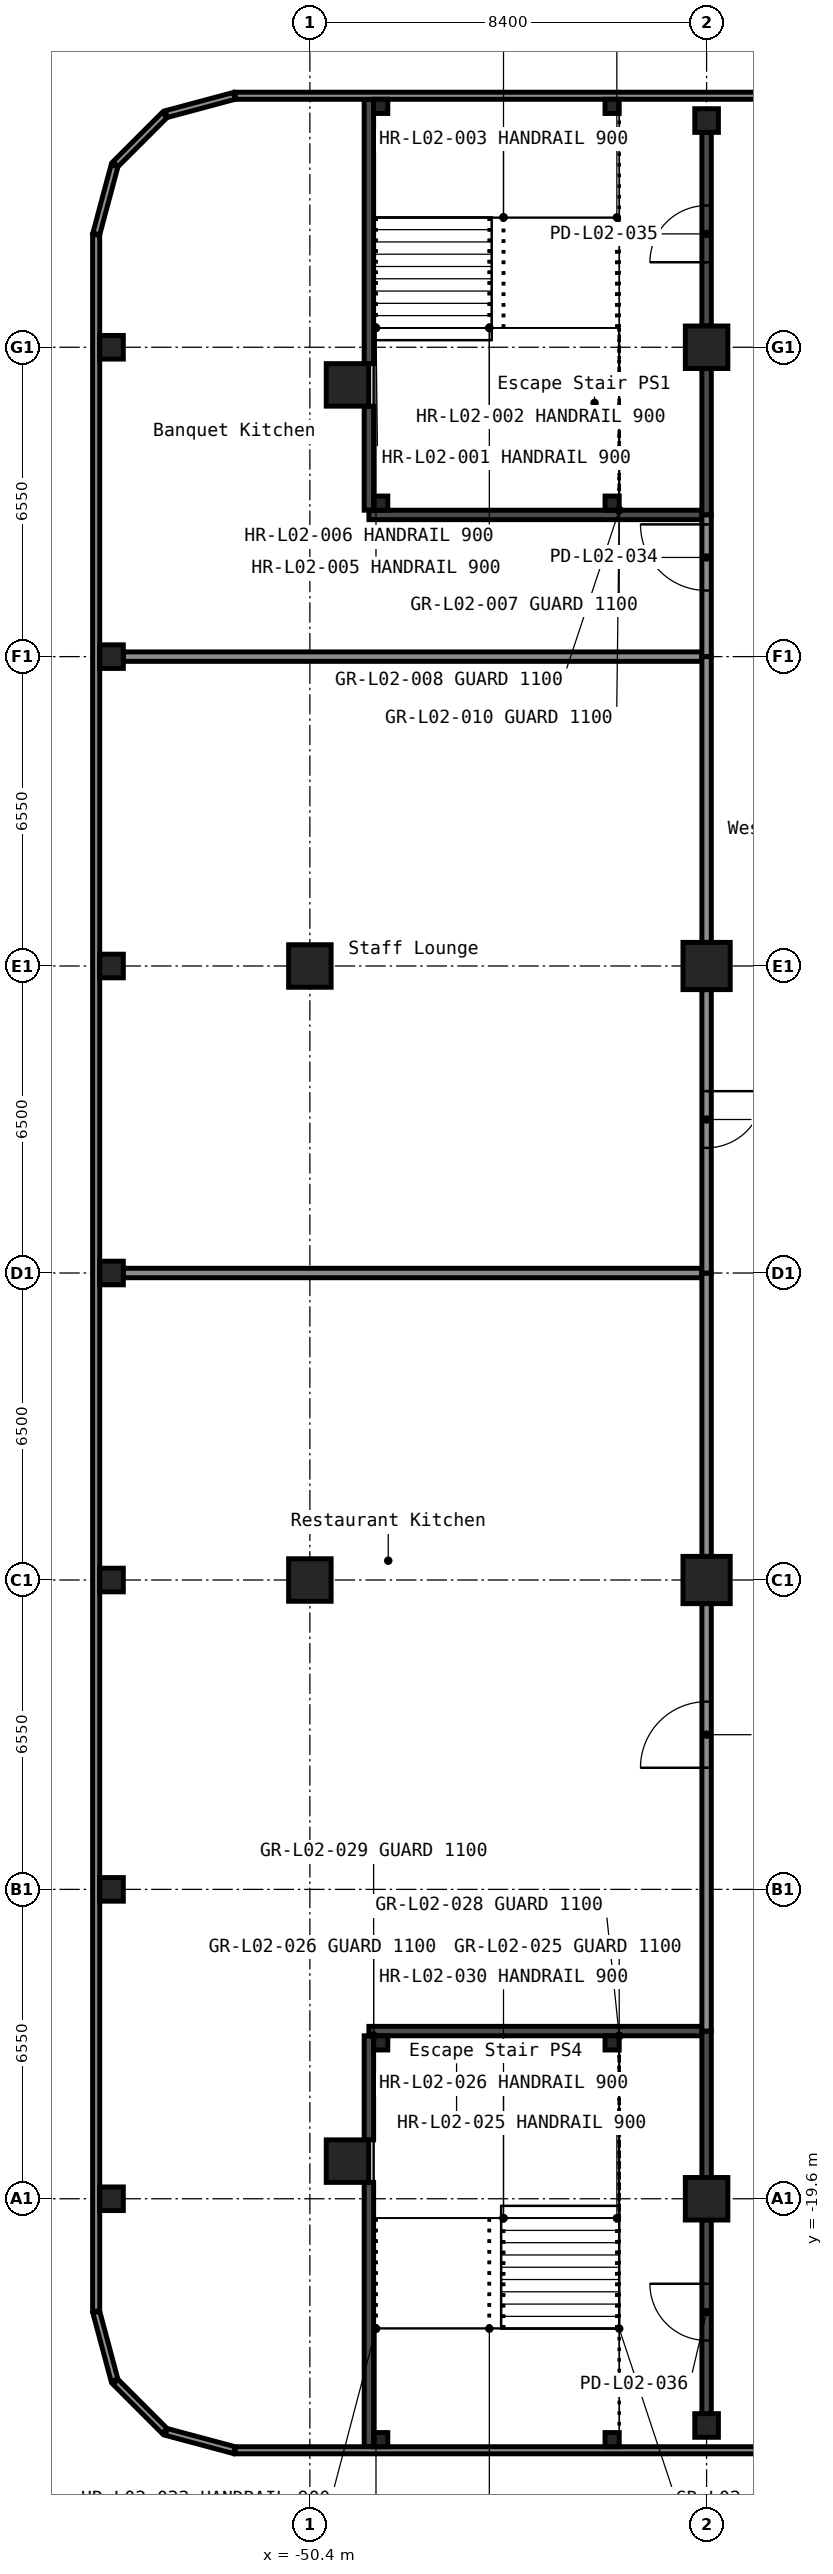
"""IFC4 building model, lengths in metres.
Left out: names, types, materials, properties, quantities, classifications, styles, units other than length and angle.
Written with IfcOpenShell. Run it as: python <this file> out.ifc"""

import sys

from ifc_helpers import new_model, si_unit, direction, frame, frame_2d, origin, origin_2d, place, context, subcontext, project, spatial, rectangle, hollow_rectangle, extrude, element, fill, save


model = new_model("IFC4")
c1 = context("Model", 3, precision=1e-05, world=origin(), true_north=direction((0.0, 1.0)))
c2 = subcontext(c1, "Body", "Model", "MODEL_VIEW")
j1 = project(units=[si_unit("LENGTHUNIT", "METRE"), si_unit("PLANEANGLEUNIT", "RADIAN")], contexts=[c1])
p1 = place(None, origin())
s1 = spatial("IfcSite", under=j1, at=p1, CompositionType="ELEMENT")
p2 = place(p1, origin())
s2 = spatial("IfcBuilding", under=s1, at=p2, CompositionType="ELEMENT")
p3 = place(p2, frame((0.0, 0.0, 9.0)))
s3 = spatial("IfcBuildingStorey", under=s2, at=p3, CompositionType="ELEMENT", Elevation=9.0)
for number, where, z_axis, x_axis in (
    (1, (-49.603, -18.803, 0.0), (0.0, 0.0, 1.0), (1.0, 0.0, 0.0)),
    (2, (-50.4, -6.5, 0.0), (0.0, 0.0, 1.0), (1.0, 0.0, 0.0)),
    (3, (-50.4, 6.5, 0.0), (0.0, 0.0, 1.0), (1.0, 0.0, 0.0)),
    (4, (-49.603, 18.803, 0.0), (0.0, 0.0, 1.0), (1.0, 0.0, 0.0)),
    (5, (-42.0, -19.6, 0.0), (0.0, 0.0, 1.0), (1.0, 0.0, 0.0)),
):
    element("IfcColumn", number, at=place(p3, frame(where, z_axis=z_axis, x_axis=x_axis)), inside=s3, PredefinedType="COLUMN", context=c2, shape_type="SweptSolid", body=[
        extrude(hollow_rectangle(XDim=0.9, YDim=0.9, WallThickness=0.036, at=origin_2d()), origin(), (0.0, 0.0, 1.0), 5.6),
    ])
for number, where, z_axis, x_axis in (
    (6, (-42.0, -6.5, 0.0), (0.0, 0.0, 1.0), (1.0, 0.0, 0.0)),
    (7, (-42.0, 6.5, 0.0), (0.0, 0.0, 1.0), (1.0, 0.0, 0.0)),
):
    element("IfcColumn", number, at=place(p3, frame(where, z_axis=z_axis, x_axis=x_axis)), inside=s3, PredefinedType="COLUMN", context=c2, shape_type="SweptSolid", body=[
        extrude(hollow_rectangle(XDim=1.0, YDim=1.0, WallThickness=0.04, at=origin_2d()), origin(), (0.0, 0.0, 1.0), 5.6),
    ])
p4 = place(p3, frame((-42.0, 19.6, 0.0), z_axis=(0.0, 0.0, 1.0), x_axis=(1.0, 0.0, 0.0)))
e8 = element("IfcColumn", 8, at=p4, inside=s3, PredefinedType="COLUMN", context=c2, shape_type="SweptSolid", body=[
    extrude(hollow_rectangle(XDim=0.9, YDim=0.9, WallThickness=0.036, at=origin_2d()), origin(), (0.0, 0.0, 1.0), 5.6),
])
for number, where, z_axis, x_axis in (
    (9, (-42.0, -24.4, 0.0), (0.0, 0.0, 1.0), (1.0, 0.0, 0.0)),
    (10, (-42.0, 24.4, 0.0), (0.0, 0.0, 1.0), (1.0, 0.0, 0.0)),
    (11, (-54.6, -19.6, 0.0), (0.0, 0.0, 1.0), (1.0, 0.0, 0.0)),
    (12, (-54.6, -13.05, 0.0), (0.0, 0.0, 1.0), (1.0, 0.0, 0.0)),
    (13, (-54.6, -6.5, 0.0), (0.0, 0.0, 1.0), (1.0, 0.0, 0.0)),
    (14, (-54.6, 0.0, 0.0), (0.0, 0.0, 1.0), (1.0, 0.0, 0.0)),
    (15, (-54.6, 6.5, 0.0), (0.0, 0.0, 1.0), (1.0, 0.0, 0.0)),
    (16, (-54.6, 13.05, 0.0), (0.0, 0.0, 1.0), (1.0, 0.0, 0.0)),
    (17, (-54.6, 19.6, 0.0), (0.0, 0.0, 1.0), (1.0, 0.0, 0.0)),
):
    element("IfcColumn", number, at=place(p3, frame(where, z_axis=z_axis, x_axis=x_axis)), inside=s3, PredefinedType="COLUMN", context=c2, shape_type="SweptSolid", body=[
        extrude(hollow_rectangle(XDim=0.5, YDim=0.5, WallThickness=0.019, InnerFilletRadius=0.029, OuterFilletRadius=0.048, at=origin_2d()), origin(), (0.0, 0.0, 1.0), 5.6),
    ])
for number, where, z_axis, x_axis in (
    (18, (-48.9, 16.3, -0.3), (0.0, 0.0, 1.0), (1.0, 0.0, 0.0)),
    (19, (-44.0, 16.3, -0.3), (0.0, 0.0, 1.0), (1.0, 0.0, 0.0)),
    (20, (-44.0, -16.3, -0.3), (0.0, 0.0, 1.0), (1.0, 0.0, 0.0)),
    (21, (-48.9, -16.3, -0.3), (0.0, 0.0, 1.0), (1.0, 0.0, 0.0)),
):
    element("IfcColumn", number, at=place(p3, frame(where, z_axis=z_axis, x_axis=x_axis)), inside=s3, PredefinedType="COLUMN", context=c2, shape_type="SweptSolid", body=[
        extrude(rectangle(XDim=0.3, YDim=0.3, at=origin_2d()), origin(), (0.0, 0.0, 1.0), 1.55),
    ])
p5 = place(p3, frame((-54.35, 0.0, 0.0), z_axis=(0.0, 0.0, 1.0), x_axis=(1.0, 0.0, 0.0)))
e22 = element("IfcWall", 22, at=p5, inside=s3, PredefinedType="PARTITIONING", context=c2, shape_type="SweptSolid", body=[
    extrude(rectangle(XDim=12.25, YDim=0.2, at=frame_2d((6.125, 0.0))), origin(), (0.0, 0.0, 1.0), 5.6),
])
p6 = place(p3, frame((-49.15, 16.15, 0.0), z_axis=(0.0, 0.0, 1.0), x_axis=(0.0, 1.0, 0.0)))
e23 = element("IfcWall", 23, at=p6, inside=s3, PredefinedType="SHEAR", context=c2, shape_type="SweptSolid", body=[
    extrude(rectangle(XDim=2.203, YDim=0.2, at=frame_2d((1.102, 0.0))), origin(), (0.0, 0.0, 1.0), 5.6),
])
p7 = place(p3, frame((-49.15, 19.253, 0.0), z_axis=(0.0, 0.0, 1.0), x_axis=(0.0, 1.0, 0.0)))
e24 = element("IfcWall", 24, at=p7, inside=s3, PredefinedType="SHEAR", context=c2, shape_type="SweptSolid", body=[
    extrude(rectangle(XDim=5.597, YDim=0.2, at=frame_2d((2.798, 0.0))), origin(), (0.0, 0.0, 1.0), 5.6),
])
p8 = place(p3, frame((-42.1, 16.05, 0.0), z_axis=(0.0, 0.0, 1.0), x_axis=(-1.0, 0.0, 0.0)))
e25 = element("IfcWall", 25, at=p8, inside=s3, PredefinedType="SHEAR", context=c2, shape_type="SweptSolid", body=[
    extrude(rectangle(XDim=7.05, YDim=0.2, at=frame_2d((3.525, 0.0))), origin(), (0.0, 0.0, 1.0), 5.6),
])
p9 = place(p3, frame((-42.0, 24.15, 0.0), z_axis=(0.0, 0.0, 1.0), x_axis=(0.0, -1.0, 0.0)))
e26 = element("IfcWall", 26, at=p9, inside=s3, PredefinedType="SHEAR", context=c2, shape_type="SweptSolid", body=[
    extrude(rectangle(XDim=4.1, YDim=0.2, at=frame_2d((2.05, 0.0))), origin(), (0.0, 0.0, 1.0), 5.6),
])
p10 = place(p9, frame((1.55, 0.0, 0.0)))
e27 = element("IfcOpeningElement", 27, at=p10, cuts=e26, PredefinedType="OPENING", context=c2, shape_type="SweptSolid", body=[
    extrude(rectangle(XDim=1.2, YDim=2.1, at=frame_2d((0.6, 1.05))), frame((0.0, 0.11, 0.0), z_axis=(0.0, -1.0, 0.0), x_axis=(1.0, 0.0, 0.0)), (0.0, 0.0, 1.0), 0.22),
])
p11 = place(p3, frame((-42.0, 19.15, 0.0), z_axis=(0.0, 0.0, 1.0), x_axis=(0.0, -1.0, 0.0)))
e28 = element("IfcWall", 28, at=p11, inside=s3, PredefinedType="SHEAR", context=c2, shape_type="SweptSolid", body=[
    extrude(rectangle(XDim=3.1, YDim=0.2, at=frame_2d((1.55, 0.0))), origin(), (0.0, 0.0, 1.0), 5.6),
])
p12 = place(p3, frame((-49.15, -24.85, 0.0), z_axis=(0.0, 0.0, 1.0), x_axis=(0.0, 1.0, 0.0)))
e29 = element("IfcWall", 29, at=p12, inside=s3, PredefinedType="SHEAR", context=c2, shape_type="SweptSolid", body=[
    extrude(rectangle(XDim=5.597, YDim=0.2, at=frame_2d((2.798, 0.0))), origin(), (0.0, 0.0, 1.0), 5.6),
])
p13 = place(p3, frame((-49.15, -18.353, 0.0), z_axis=(0.0, 0.0, 1.0), x_axis=(0.0, 1.0, 0.0)))
e30 = element("IfcWall", 30, at=p13, inside=s3, PredefinedType="SHEAR", context=c2, shape_type="SweptSolid", body=[
    extrude(rectangle(XDim=2.203, YDim=0.2, at=frame_2d((1.102, 0.0))), origin(), (0.0, 0.0, 1.0), 5.6),
])
p14 = place(p3, frame((-49.15, -16.05, 0.0), z_axis=(0.0, 0.0, 1.0), x_axis=(1.0, 0.0, 0.0)))
e31 = element("IfcWall", 31, at=p14, inside=s3, PredefinedType="SHEAR", context=c2, shape_type="SweptSolid", body=[
    extrude(rectangle(XDim=7.05, YDim=0.2, at=frame_2d((3.525, 0.0))), origin(), (0.0, 0.0, 1.0), 5.6),
])
p15 = place(p3, frame((-42.0, -16.05, 0.0), z_axis=(0.0, 0.0, 1.0), x_axis=(0.0, -1.0, 0.0)))
e32 = element("IfcWall", 32, at=p15, inside=s3, PredefinedType="SHEAR", context=c2, shape_type="SweptSolid", body=[
    extrude(rectangle(XDim=3.1, YDim=0.2, at=frame_2d((1.55, 0.0))), origin(), (0.0, 0.0, 1.0), 5.6),
])
p16 = place(p3, frame((-42.0, -20.05, 0.0), z_axis=(0.0, 0.0, 1.0), x_axis=(0.0, -1.0, 0.0)))
e33 = element("IfcWall", 33, at=p16, inside=s3, PredefinedType="SHEAR", context=c2, shape_type="SweptSolid", body=[
    extrude(rectangle(XDim=4.1, YDim=0.2, at=frame_2d((2.05, 0.0))), origin(), (0.0, 0.0, 1.0), 5.6),
])
p17 = place(p16, frame((1.35, 0.0, 0.0)))
e34 = element("IfcOpeningElement", 34, at=p17, cuts=e33, PredefinedType="OPENING", context=c2, shape_type="SweptSolid", body=[
    extrude(rectangle(XDim=1.2, YDim=2.1, at=frame_2d((0.6, 1.05))), frame((0.0, 0.11, 0.0), z_axis=(0.0, -1.0, 0.0), x_axis=(1.0, 0.0, 0.0)), (0.0, 0.0, 1.0), 0.22),
])
p18 = place(p3, frame((-54.35, 13.05, 0.0), z_axis=(0.0, 0.0, 1.0), x_axis=(1.0, 0.0, 0.0)))
e35 = element("IfcWall", 35, at=p18, inside=s3, PredefinedType="PARTITIONING", context=c2, shape_type="SweptSolid", body=[
    extrude(rectangle(XDim=12.25, YDim=0.2, at=frame_2d((6.125, 0.0))), origin(), (0.0, 0.0, 1.0), 5.6),
])
p19 = place(p3, frame((-42.0, 13.05, 0.0), z_axis=(0.0, 0.0, 1.0), x_axis=(0.0, 1.0, 0.0)))
e36 = element("IfcWall", 36, at=p19, inside=s3, PredefinedType="PARTITIONING", context=c2, shape_type="SweptSolid", body=[
    extrude(rectangle(XDim=3.0, YDim=0.2, at=frame_2d((1.5, 0.0))), origin(), (0.0, 0.0, 1.0), 5.6),
])
p20 = place(p19, frame((1.4, 0.0, 0.0)))
e37 = element("IfcOpeningElement", 37, at=p20, cuts=e36, PredefinedType="OPENING", context=c2, shape_type="SweptSolid", body=[
    extrude(rectangle(XDim=1.4, YDim=2.1, at=frame_2d((0.7, 1.05))), frame((0.0, 0.11, 0.0), z_axis=(0.0, -1.0, 0.0), x_axis=(1.0, 0.0, 0.0)), (0.0, 0.0, 1.0), 0.22),
])
p21 = place(p3, frame((-42.0, -16.05, 0.0), z_axis=(0.0, 0.0, 1.0), x_axis=(0.0, 1.0, 0.0)))
e38 = element("IfcWall", 38, at=p21, inside=s3, PredefinedType="PARTITIONING", context=c2, shape_type="SweptSolid", body=[
    extrude(rectangle(XDim=9.05, YDim=0.2, at=frame_2d((4.525, 0.0))), origin(), (0.0, 0.0, 1.0), 5.6),
])
p22 = place(p21, frame((5.575, 0.0, 0.0)))
e39 = element("IfcOpeningElement", 39, at=p22, cuts=e38, PredefinedType="OPENING", context=c2, shape_type="SweptSolid", body=[
    extrude(rectangle(XDim=1.4, YDim=2.1, at=frame_2d((0.7, 1.05))), frame((0.0, 0.11, 0.0), z_axis=(0.0, -1.0, 0.0), x_axis=(1.0, 0.0, 0.0)), (0.0, 0.0, 1.0), 0.22),
])
p23 = place(p3, frame((-42.0, -6.0, 0.0), z_axis=(0.0, 0.0, 1.0), x_axis=(0.0, 1.0, 0.0)))
e40 = element("IfcWall", 40, at=p23, inside=s3, PredefinedType="PARTITIONING", context=c2, shape_type="SweptSolid", body=[
    extrude(rectangle(XDim=6.0, YDim=0.2, at=frame_2d((3.0, 0.0))), origin(), (0.0, 0.0, 1.0), 5.6),
])
p24 = place(p3, frame((-42.0, 0.0, 0.0), z_axis=(0.0, 0.0, 1.0), x_axis=(0.0, 1.0, 0.0)))
e41 = element("IfcWall", 41, at=p24, inside=s3, PredefinedType="PARTITIONING", context=c2, shape_type="SweptSolid", body=[
    extrude(rectangle(XDim=6.0, YDim=0.2, at=frame_2d((3.0, 0.0))), origin(), (0.0, 0.0, 1.0), 5.6),
])
p25 = place(p24, frame((2.65, 0.0, 0.0)))
e42 = element("IfcOpeningElement", 42, at=p25, cuts=e41, PredefinedType="OPENING", context=c2, shape_type="SweptSolid", body=[
    extrude(rectangle(XDim=1.2, YDim=2.1, at=frame_2d((0.6, 1.05))), frame((0.0, 0.11, 0.0), z_axis=(0.0, -1.0, 0.0), x_axis=(1.0, 0.0, 0.0)), (0.0, 0.0, 1.0), 0.22),
])
p26 = place(p3, frame((-42.0, 7.0, 0.0), z_axis=(0.0, 0.0, 1.0), x_axis=(0.0, 1.0, 0.0)))
e43 = element("IfcWall", 43, at=p26, inside=s3, PredefinedType="PARTITIONING", context=c2, shape_type="SweptSolid", body=[
    extrude(rectangle(XDim=6.05, YDim=0.2, at=frame_2d((3.025, 0.0))), origin(), (0.0, 0.0, 1.0), 5.6),
])
p27 = place(p3, frame((-39.0, -24.925, 0.0), z_axis=(0.0, 0.0, 1.0), x_axis=(-1.0, 0.0, 0.0)))
e44 = element("IfcWall", 44, at=p27, inside=s3, PredefinedType="STANDARD", context=c2, shape_type="SweptSolid", body=[
    extrude(rectangle(XDim=12.98, YDim=0.15, at=frame_2d((6.49, 0.0))), origin(), (0.0, 0.0, 1.0), 5.6),
])
p28 = place(p3, frame((-52.0, -24.922, 0.0), z_axis=(0.0, 0.0, 1.0), x_axis=(-0.965946591624, 0.258741535379, 0.0)))
e45 = element("IfcWall", 45, at=p28, inside=s3, PredefinedType="STANDARD", context=c2, shape_type="SweptSolid", body=[
    extrude(rectangle(XDim=1.493, YDim=0.15, at=frame_2d((0.746, 0.0))), origin(), (0.0, 0.0, 1.0), 5.6),
])
p29 = place(p3, frame((-53.475, -24.517, 0.0), z_axis=(0.0, 0.0, 1.0), x_axis=(-0.707106781187, 0.707106781187, 0.0)))
e46 = element("IfcWall", 46, at=p29, inside=s3, PredefinedType="STANDARD", context=c2, shape_type="SweptSolid", body=[
    extrude(rectangle(XDim=1.473, YDim=0.15, at=frame_2d((0.736, 0.0))), origin(), (0.0, 0.0, 1.0), 5.6),
])
p30 = place(p3, frame((-54.536, -23.442, 0.0), z_axis=(0.0, 0.0, 1.0), x_axis=(-0.258741535379, 0.965946591624, 0.0)))
e47 = element("IfcWall", 47, at=p30, inside=s3, PredefinedType="STANDARD", context=c2, shape_type="SweptSolid", body=[
    extrude(rectangle(XDim=1.493, YDim=0.15, at=frame_2d((0.746, 0.0))), origin(), (0.0, 0.0, 1.0), 5.6),
])
p31 = place(p3, frame((-54.925, -21.98, 0.0), z_axis=(0.0, 0.0, 1.0), x_axis=(0.0, 1.0, 0.0)))
e48 = element("IfcWall", 48, at=p31, inside=s3, PredefinedType="STANDARD", context=c2, shape_type="SweptSolid", body=[
    extrude(rectangle(XDim=43.96, YDim=0.15, at=frame_2d((21.98, 0.0))), origin(), (0.0, 0.0, 1.0), 5.6),
])
p32 = place(p3, frame((-54.922, 22.0, 0.0), z_axis=(0.0, 0.0, 1.0), x_axis=(0.258741535379, 0.965946591624, 0.0)))
e49 = element("IfcWall", 49, at=p32, inside=s3, PredefinedType="STANDARD", context=c2, shape_type="SweptSolid", body=[
    extrude(rectangle(XDim=1.493, YDim=0.15, at=frame_2d((0.746, 0.0))), origin(), (0.0, 0.0, 1.0), 5.6),
])
p33 = place(p3, frame((-54.517, 23.475, 0.0), z_axis=(0.0, 0.0, 1.0), x_axis=(0.707106781187, 0.707106781187, 0.0)))
e50 = element("IfcWall", 50, at=p33, inside=s3, PredefinedType="STANDARD", context=c2, shape_type="SweptSolid", body=[
    extrude(rectangle(XDim=1.473, YDim=0.15, at=frame_2d((0.736, 0.0))), origin(), (0.0, 0.0, 1.0), 5.6),
])
p34 = place(p3, frame((-53.442, 24.536, 0.0), z_axis=(0.0, 0.0, 1.0), x_axis=(0.965946591624, 0.258741535379, 0.0)))
e51 = element("IfcWall", 51, at=p34, inside=s3, PredefinedType="STANDARD", context=c2, shape_type="SweptSolid", body=[
    extrude(rectangle(XDim=1.493, YDim=0.15, at=frame_2d((0.746, 0.0))), origin(), (0.0, 0.0, 1.0), 5.6),
])
p35 = place(p3, frame((-51.98, 24.925, 0.0), z_axis=(0.0, 0.0, 1.0), x_axis=(1.0, 0.0, 0.0)))
e52 = element("IfcWall", 52, at=p35, inside=s3, PredefinedType="STANDARD", context=c2, shape_type="SweptSolid", body=[
    extrude(rectangle(XDim=12.98, YDim=0.15, at=frame_2d((6.49, 0.0))), origin(), (0.0, 0.0, 1.0), 5.6),
])
for number, where, z_axis, x_axis in (
    (53, (-48.9, 24.7, 0.0), (0.0, 0.0, 1.0), (1.0, 0.0, 0.0)),
    (54, (-44.0, 24.7, 0.0), (0.0, 0.0, 1.0), (1.0, 0.0, 0.0)),
    (55, (-48.9, 16.3, 1.5), (0.0, 0.0, 1.0), (1.0, 0.0, 0.0)),
    (56, (-44.0, 16.3, 1.5), (0.0, 0.0, 1.0), (1.0, 0.0, 0.0)),
    (57, (-44.0, -24.7, 0.0), (0.0, 0.0, 1.0), (1.0, 0.0, 0.0)),
    (58, (-48.9, -24.7, 0.0), (0.0, 0.0, 1.0), (1.0, 0.0, 0.0)),
    (59, (-44.0, -16.3, 1.5), (0.0, 0.0, 1.0), (1.0, 0.0, 0.0)),
    (60, (-48.9, -16.3, 1.5), (0.0, 0.0, 1.0), (1.0, 0.0, 0.0)),
):
    element("IfcColumn", number, at=place(p3, frame(where, z_axis=z_axis, x_axis=x_axis)), inside=s3, PredefinedType="COLUMN", context=c2, shape_type="SweptSolid", body=[
        extrude(rectangle(XDim=0.3, YDim=0.3, at=origin_2d()), origin(), (0.0, 0.0, 1.0), 2.75),
    ])
p36 = place(p22, origin())
e61 = element("IfcDoor", 61, at=p36, inside=s3, OperationType="SINGLE_SWING_RIGHT", PredefinedType="DOOR", context=c2, shape_type="SweptSolid", body=[
    extrude(rectangle(XDim=1.4, YDim=2.1, at=frame_2d((0.7, 1.05))), frame((0.0, 0.025, 0.0), z_axis=(0.0, -1.0, 0.0), x_axis=(1.0, 0.0, 0.0)), (0.0, 0.0, 1.0), 0.05),
])
fill(e39, e61)
p37 = place(p25, origin())
e62 = element("IfcDoor", 62, at=p37, inside=s3, OperationType="SINGLE_SWING_RIGHT", PredefinedType="DOOR", context=c2, shape_type="SweptSolid", body=[
    extrude(rectangle(XDim=1.2, YDim=2.1, at=frame_2d((0.6, 1.05))), frame((0.0, 0.025, 0.0), z_axis=(0.0, -1.0, 0.0), x_axis=(1.0, 0.0, 0.0)), (0.0, 0.0, 1.0), 0.05),
])
fill(e42, e62)
p38 = place(p20, origin())
e63 = element("IfcDoor", 63, at=p38, inside=s3, OperationType="SINGLE_SWING_LEFT", PredefinedType="DOOR", context=c2, shape_type="SweptSolid", body=[
    extrude(rectangle(XDim=1.4, YDim=2.1, at=frame_2d((0.7, 1.05))), frame((0.0, 0.025, 0.0), z_axis=(0.0, -1.0, 0.0), x_axis=(1.0, 0.0, 0.0)), (0.0, 0.0, 1.0), 0.05),
])
fill(e37, e63)
p39 = place(p10, origin())
e64 = element("IfcDoor", 64, at=p39, inside=s3, OperationType="SINGLE_SWING_RIGHT", PredefinedType="DOOR", context=c2, shape_type="SweptSolid", body=[
    extrude(rectangle(XDim=1.2, YDim=2.1, at=frame_2d((0.6, 1.05))), frame((0.0, 0.025, 0.0), z_axis=(0.0, -1.0, 0.0), x_axis=(1.0, 0.0, 0.0)), (0.0, 0.0, 1.0), 0.05),
])
fill(e27, e64)
p40 = place(p17, origin())
e65 = element("IfcDoor", 65, at=p40, inside=s3, OperationType="SINGLE_SWING_LEFT", PredefinedType="DOOR", context=c2, shape_type="SweptSolid", body=[
    extrude(rectangle(XDim=1.2, YDim=2.1, at=frame_2d((0.6, 1.05))), frame((0.0, 0.025, 0.0), z_axis=(0.0, -1.0, 0.0), x_axis=(1.0, 0.0, 0.0)), (0.0, 0.0, 1.0), 0.05),
])
fill(e34, e65)
save(model, sys.argv[1])
